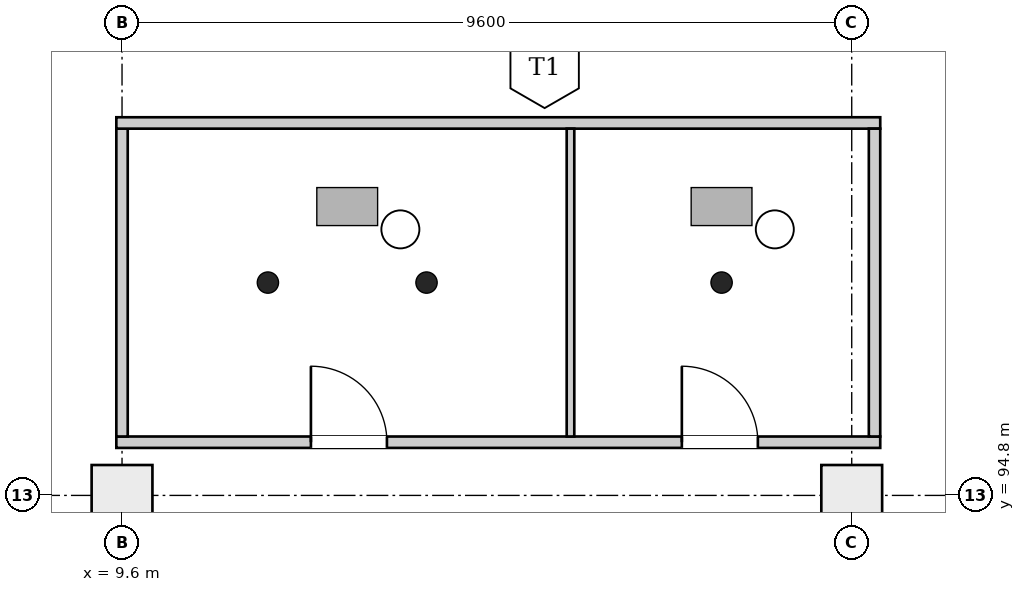
"""IFC4 building model, lengths in metres.
Left out: names, types, materials, properties, quantities, classifications, styles, units other than length and angle.
Written with IfcOpenShell. Run it as: python <this file> out.ifc"""

import sys

from ifc_helpers import new_model, si_unit, direction, frame, frame_2d, origin, origin_2d, place, context, subcontext, project, spatial, rectangle, extrude, element, fill, save


model = new_model("IFC4")
c1 = context("Model", 3, precision=1e-05, world=origin(), true_north=direction((0.0, 1.0)))
c2 = subcontext(c1, "Body", "Model", "MODEL_VIEW")
j1 = project(units=[si_unit("LENGTHUNIT", "METRE"), si_unit("PLANEANGLEUNIT", "RADIAN")], contexts=[c1])
p1 = place(None, origin())
s1 = spatial("IfcSite", under=j1, at=p1, CompositionType="ELEMENT")
p2 = place(p1, origin())
s2 = spatial("IfcBuilding", under=s1, at=p2, CompositionType="ELEMENT")
p3 = place(p2, frame((0.0, 0.0, 26.7)))
s3 = spatial("IfcBuildingStorey", under=s2, at=p3, CompositionType="ELEMENT", Elevation=26.7)
for number, where, z_axis, x_axis in (
    (1, (9.6, 94.8, 0.0), (0.0, 0.0, 1.0), (1.0, 0.0, 0.0)),
    (2, (19.2, 94.8, 0.0), (0.0, 0.0, 1.0), (1.0, 0.0, 0.0)),
):
    element("IfcColumn", number, at=place(p3, frame(where, z_axis=z_axis, x_axis=x_axis)), inside=s3, PredefinedType="COLUMN", context=c2, shape_type="SweptSolid", body=[
        extrude(rectangle(XDim=0.8, YDim=0.8, at=origin_2d()), origin(), (0.0, 0.0, 1.0), 5.2),
    ])
p4 = place(p3, frame((9.525, 95.5, 0.0), z_axis=(0.0, 0.0, 1.0), x_axis=(1.0, 0.0, 0.0)))
e3 = element("IfcWall", 3, at=p4, inside=s3, PredefinedType="PARTITIONING", context=c2, shape_type="SweptSolid", body=[
    extrude(rectangle(XDim=10.05, YDim=0.15, at=frame_2d((5.025, 0.0))), origin(), (0.0, 0.0, 1.0), 4.85),
])
p5 = place(p4, frame((2.56, 0.0, 0.0)))
e4 = element("IfcOpeningElement", 4, at=p5, cuts=e3, PredefinedType="OPENING", context=c2, shape_type="SweptSolid", body=[
    extrude(rectangle(XDim=1.0, YDim=2.1, at=frame_2d((0.5, 1.05))), frame((0.0, 0.085, 0.0), z_axis=(0.0, -1.0, 0.0), x_axis=(1.0, 0.0, 0.0)), (0.0, 0.0, 1.0), 0.17),
])
p6 = place(p4, frame((7.44, 0.0, 0.0)))
e5 = element("IfcOpeningElement", 5, at=p6, cuts=e3, PredefinedType="OPENING", context=c2, shape_type="SweptSolid", body=[
    extrude(rectangle(XDim=1.0, YDim=2.1, at=frame_2d((0.5, 1.05))), frame((0.0, 0.085, 0.0), z_axis=(0.0, -1.0, 0.0), x_axis=(1.0, 0.0, 0.0)), (0.0, 0.0, 1.0), 0.17),
])
p7 = place(p3, frame((9.6, 95.575, 0.0), z_axis=(0.0, 0.0, 1.0), x_axis=(0.0, 1.0, 0.0)))
e6 = element("IfcWall", 6, at=p7, inside=s3, PredefinedType="PARTITIONING", context=c2, shape_type="SweptSolid", body=[
    extrude(rectangle(XDim=4.05, YDim=0.15, at=frame_2d((2.025, 0.0))), origin(), (0.0, 0.0, 1.0), 4.45),
])
p8 = place(p3, frame((9.525, 99.7, 0.0), z_axis=(0.0, 0.0, 1.0), x_axis=(1.0, 0.0, 0.0)))
e7 = element("IfcWall", 7, at=p8, inside=s3, PredefinedType="PARTITIONING", context=c2, shape_type="SweptSolid", body=[
    extrude(rectangle(XDim=10.05, YDim=0.15, at=frame_2d((5.025, 0.0))), origin(), (0.0, 0.0, 1.0), 4.85),
])
p9 = place(p3, frame((15.5, 95.575, 0.0), z_axis=(0.0, 0.0, 1.0), x_axis=(0.0, 1.0, 0.0)))
e8 = element("IfcWall", 8, at=p9, inside=s3, PredefinedType="PARTITIONING", context=c2, shape_type="SweptSolid", body=[
    extrude(rectangle(XDim=4.05, YDim=0.1, at=frame_2d((2.025, 0.0))), origin(), (0.0, 0.0, 1.0), 4.85),
])
p10 = place(p3, frame((19.5, 95.575, 0.0), z_axis=(0.0, 0.0, 1.0), x_axis=(0.0, 1.0, 0.0)))
e9 = element("IfcWall", 9, at=p10, inside=s3, PredefinedType="PARTITIONING", context=c2, shape_type="SweptSolid", body=[
    extrude(rectangle(XDim=4.05, YDim=0.15, at=frame_2d((2.025, 0.0))), origin(), (0.0, 0.0, 1.0), 4.85),
])
p11 = place(p5, origin())
e10 = element("IfcDoor", 10, at=p11, inside=s3, OperationType="SINGLE_SWING_LEFT", PredefinedType="DOOR", context=c2, shape_type="SweptSolid", body=[
    extrude(rectangle(XDim=1.0, YDim=2.1, at=frame_2d((0.5, 1.05))), frame((0.0, 0.025, 0.0), z_axis=(0.0, -1.0, 0.0), x_axis=(1.0, 0.0, 0.0)), (0.0, 0.0, 1.0), 0.05),
])
fill(e4, e10)
p12 = place(p6, origin())
e11 = element("IfcDoor", 11, at=p12, inside=s3, OperationType="SINGLE_SWING_RIGHT", PredefinedType="DOOR", context=c2, shape_type="SweptSolid", body=[
    extrude(rectangle(XDim=1.0, YDim=2.1, at=frame_2d((0.5, 1.05))), frame((0.0, 0.025, 0.0), z_axis=(0.0, -1.0, 0.0), x_axis=(1.0, 0.0, 0.0)), (0.0, 0.0, 1.0), 0.05),
])
fill(e5, e11)
save(model, sys.argv[1])
